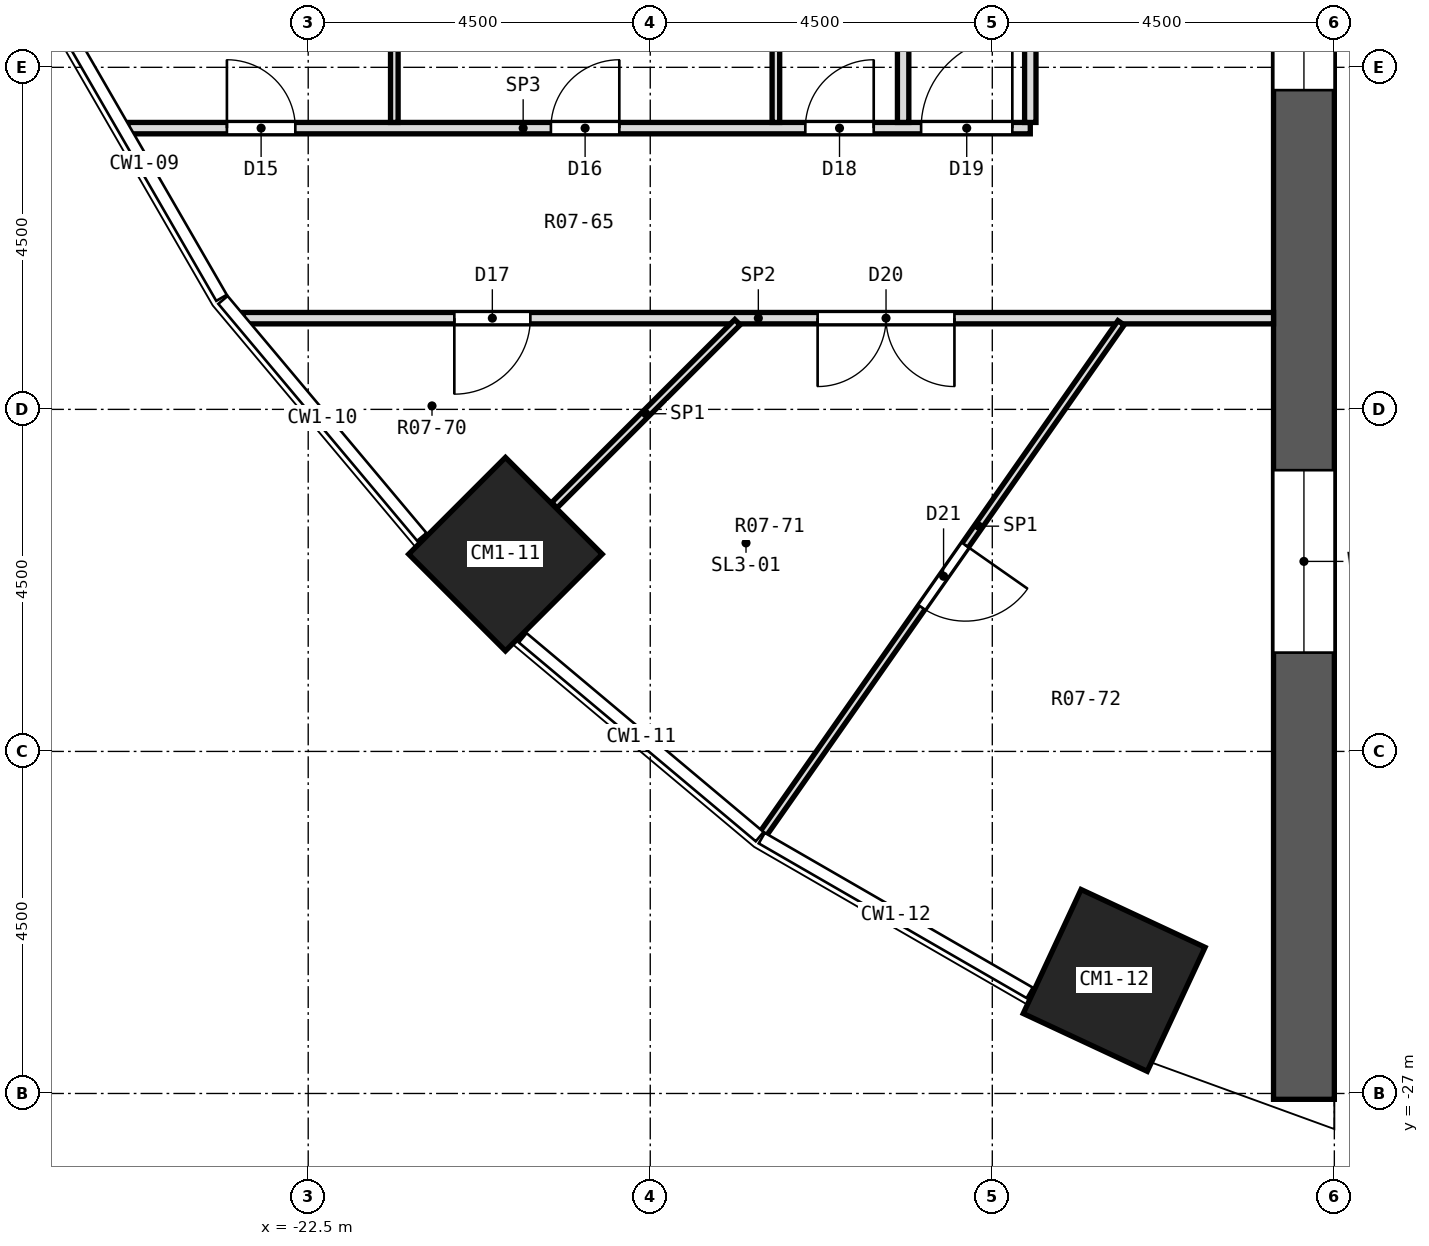
"""IFC4 building model, lengths in metres.
Left out: names, types, materials, properties, quantities, classifications, styles, units other than length and angle.
Written with IfcOpenShell. Run it as: python <this file> out.ifc"""

import sys

from ifc_helpers import new_model, si_unit, direction, frame, frame_2d, origin, origin_2d, place, context, subcontext, project, spatial, polyline, rectangle, outline, extrude, element, fill, save


model = new_model("IFC4")
c1 = context("Model", 3, precision=1e-05, world=origin(), true_north=direction((0.0, 1.0)))
c2 = subcontext(c1, "Body", "Model", "MODEL_VIEW")
j1 = project(units=[si_unit("LENGTHUNIT", "METRE"), si_unit("PLANEANGLEUNIT", "RADIAN")], contexts=[c1])
p1 = place(None, origin())
s1 = spatial("IfcSite", under=j1, at=p1, CompositionType="ELEMENT")
p2 = place(p1, origin())
s2 = spatial("IfcBuilding", under=s1, at=p2, CompositionType="ELEMENT")
p3 = place(p2, frame((0.0, 0.0, 17.6)))
s3 = spatial("IfcBuildingStorey", under=s2, at=p3, CompositionType="ELEMENT", Elevation=17.6)
for number, where, z_axis, x_axis in (
    (1, (-19.905, -19.905, 0.0), (0.0, 0.0, 1.0), (-0.707, -0.707, 0.0)),
    (2, (-11.897, -25.512, 0.0), (0.0, 0.0, 1.0), (-0.423, -0.906, 0.0)),
):
    element("IfcColumn", number, at=place(p3, frame(where, z_axis=z_axis, x_axis=x_axis)), inside=s3, PredefinedType="COLUMN", context=c2, shape_type="SweptSolid", body=[
        extrude(rectangle(XDim=1.8, YDim=1.8, at=origin_2d()), origin(), (0.0, 0.0, 1.0), 4.2),
    ])
p4 = place(p3, frame((-9.4, -27.077, 0.0), z_axis=(0.0, 0.0, 1.0), x_axis=(0.0, 1.0, 0.0)))
e3 = element("IfcWall", 3, at=p4, inside=s3, PredefinedType="SHEAR", context=c2, shape_type="SweptSolid", body=[
    extrude(rectangle(XDim=54.154, YDim=0.8, at=frame_2d((27.077, 0.0))), origin(), (0.0, 0.0, 1.0), 4.2),
])
p5 = place(p4, frame((13.277, 0.0, 0.9)))
e4 = element("IfcOpeningElement", 4, at=p5, cuts=e3, PredefinedType="OPENING", context=c2, shape_type="SweptSolid", body=[
    extrude(rectangle(XDim=2.4, YDim=2.1, at=frame_2d((1.2, 1.05))), frame((0.0, 0.412, 0.0), z_axis=(0.0, -1.0, 0.0), x_axis=(1.0, 0.0, 0.0)), (0.0, 0.0, 1.0), 0.824),
])
p6 = place(p4, frame((17.877, 0.0, 0.9)))
e5 = element("IfcOpeningElement", 5, at=p6, cuts=e3, PredefinedType="OPENING", context=c2, shape_type="SweptSolid", body=[
    extrude(rectangle(XDim=2.4, YDim=2.1, at=frame_2d((1.2, 1.05))), frame((0.0, 0.412, 0.0), z_axis=(0.0, -1.0, 0.0), x_axis=(1.0, 0.0, 0.0)), (0.0, 0.0, 1.0), 0.824),
])
p7 = place(p4, frame((22.477, 0.0, 0.9)))
e6 = element("IfcOpeningElement", 6, at=p7, cuts=e3, PredefinedType="OPENING", context=c2, shape_type="SweptSolid", body=[
    extrude(rectangle(XDim=2.4, YDim=2.1, at=frame_2d((1.2, 1.05))), frame((0.0, 0.412, 0.0), z_axis=(0.0, -1.0, 0.0), x_axis=(1.0, 0.0, 0.0)), (0.0, 0.0, 1.0), 0.824),
])
p8 = place(p4, frame((29.277, 0.0, 0.9)))
e7 = element("IfcOpeningElement", 7, at=p8, cuts=e3, PredefinedType="OPENING", context=c2, shape_type="SweptSolid", body=[
    extrude(rectangle(XDim=2.4, YDim=2.1, at=frame_2d((1.2, 1.05))), frame((0.0, 0.412, 0.0), z_axis=(0.0, -1.0, 0.0), x_axis=(1.0, 0.0, 0.0)), (0.0, 0.0, 1.0), 0.824),
])
p9 = place(p4, frame((33.877, 0.0, 0.9)))
e8 = element("IfcOpeningElement", 8, at=p9, cuts=e3, PredefinedType="OPENING", context=c2, shape_type="SweptSolid", body=[
    extrude(rectangle(XDim=2.4, YDim=2.1, at=frame_2d((1.2, 1.05))), frame((0.0, 0.412, 0.0), z_axis=(0.0, -1.0, 0.0), x_axis=(1.0, 0.0, 0.0)), (0.0, 0.0, 1.0), 0.824),
])
p10 = place(p4, frame((38.477, 0.0, 0.9)))
e9 = element("IfcOpeningElement", 9, at=p10, cuts=e3, PredefinedType="OPENING", context=c2, shape_type="SweptSolid", body=[
    extrude(rectangle(XDim=2.4, YDim=2.1, at=frame_2d((1.2, 1.05))), frame((0.0, 0.412, 0.0), z_axis=(0.0, -1.0, 0.0), x_axis=(1.0, 0.0, 0.0)), (0.0, 0.0, 1.0), 0.824),
])
p11 = place(p4, frame((5.877, 0.0, 0.9)))
e10 = element("IfcOpeningElement", 10, at=p11, cuts=e3, PredefinedType="OPENING", context=c2, shape_type="SweptSolid", body=[
    extrude(rectangle(XDim=2.4, YDim=2.1, at=frame_2d((1.2, 1.05))), frame((0.0, 0.412, 0.0), z_axis=(0.0, -1.0, 0.0), x_axis=(1.0, 0.0, 0.0)), (0.0, 0.0, 1.0), 0.824),
])
p12 = place(p4, frame((45.877, 0.0, 0.9)))
e11 = element("IfcOpeningElement", 11, at=p12, cuts=e3, PredefinedType="OPENING", context=c2, shape_type="SweptSolid", body=[
    extrude(rectangle(XDim=2.4, YDim=2.1, at=frame_2d((1.2, 1.05))), frame((0.0, 0.412, 0.0), z_axis=(0.0, -1.0, 0.0), x_axis=(1.0, 0.0, 0.0)), (0.0, 0.0, 1.0), 0.824),
])
p13 = place(p3, frame((-11.629, -26.474, 0.0), z_axis=(-0.342019741746, -0.939690603584, 0.002016380761), x_axis=(0.00067819462, 0.001898944936, 0.999997967028)))
e12 = element("IfcWall", 12, at=p13, inside=s3, PredefinedType="SOLIDWALL", context=c2, shape_type="SweptSolid", body=[
    extrude(outline(polyline([(0.0, 0.0), (3.6, -1.423e-19), (3.6, -3.745), (-4.563e-05, -3.745), (0.0, 0.0)])), origin(), (0.0, 0.0, -1.0), 0.38),
])
p14 = place(p3, frame((-23.355, -16.8, 0.0), z_axis=(0.0, 0.0, 1.0), x_axis=(1.0, 0.0, 0.0)))
e13 = element("IfcWall", 13, at=p14, inside=s3, PredefinedType="PARTITIONING", context=c2, shape_type="SweptSolid", body=[
    extrude(rectangle(XDim=13.555, YDim=0.15, at=frame_2d((6.777, 0.0))), origin(), (0.0, 0.0, 1.0), 3.6),
])
p15 = place(p14, frame((2.778, 0.0, 0.0)))
e14 = element("IfcOpeningElement", 14, at=p15, cuts=e13, PredefinedType="OPENING", context=c2, shape_type="SweptSolid", body=[
    extrude(rectangle(XDim=1.0, YDim=2.1, at=frame_2d((0.5, 1.05))), frame((0.0, 0.087, 0.0), z_axis=(0.0, -1.0, 0.0), x_axis=(1.0, 0.0, 0.0)), (0.0, 0.0, 1.0), 0.174),
])
p16 = place(p14, frame((7.557, 0.0, 0.0)))
e15 = element("IfcOpeningElement", 15, at=p16, cuts=e13, PredefinedType="OPENING", context=c2, shape_type="SweptSolid", body=[
    extrude(rectangle(XDim=1.8, YDim=2.1, at=frame_2d((0.9, 1.05))), frame((0.0, 0.087, 0.0), z_axis=(0.0, -1.0, 0.0), x_axis=(1.0, 0.0, 0.0)), (0.0, 0.0, 1.0), 0.174),
])
p17 = place(p3, frame((-24.872, -14.3, 0.0), z_axis=(0.0, 0.0, 1.0), x_axis=(1.0, 0.0, 0.0)))
e16 = element("IfcWall", 16, at=p17, inside=s3, PredefinedType="PARTITIONING", context=c2, shape_type="SweptSolid", body=[
    extrude(rectangle(XDim=11.872, YDim=0.15, at=frame_2d((5.936, 0.0))), origin(), (0.0, 0.0, 1.0), 3.6),
])
p18 = place(p17, frame((1.302, 0.0, 0.0)))
e17 = element("IfcOpeningElement", 17, at=p18, cuts=e16, PredefinedType="OPENING", context=c2, shape_type="SweptSolid", body=[
    extrude(rectangle(XDim=0.9, YDim=2.1, at=frame_2d((0.45, 1.05))), frame((0.0, 0.087, 0.0), z_axis=(0.0, -1.0, 0.0), x_axis=(1.0, 0.0, 0.0)), (0.0, 0.0, 1.0), 0.174),
])
p19 = place(p17, frame((5.565, 0.0, 0.0)))
e18 = element("IfcOpeningElement", 18, at=p19, cuts=e16, PredefinedType="OPENING", context=c2, shape_type="SweptSolid", body=[
    extrude(rectangle(XDim=0.9, YDim=2.1, at=frame_2d((0.45, 1.05))), frame((0.0, 0.087, 0.0), z_axis=(0.0, -1.0, 0.0), x_axis=(1.0, 0.0, 0.0)), (0.0, 0.0, 1.0), 0.174),
])
p20 = place(p17, frame((8.912, 0.0, 0.0)))
e19 = element("IfcOpeningElement", 19, at=p20, cuts=e16, PredefinedType="OPENING", context=c2, shape_type="SweptSolid", body=[
    extrude(rectangle(XDim=0.9, YDim=2.1, at=frame_2d((0.45, 1.05))), frame((0.0, 0.087, 0.0), z_axis=(0.0, -1.0, 0.0), x_axis=(1.0, 0.0, 0.0)), (0.0, 0.0, 1.0), 0.174),
])
p21 = place(p17, frame((10.436, 0.0, 0.0)))
e20 = element("IfcOpeningElement", 20, at=p21, cuts=e16, PredefinedType="OPENING", context=c2, shape_type="SweptSolid", body=[
    extrude(rectangle(XDim=1.2, YDim=2.1, at=frame_2d((0.6, 1.05))), frame((0.0, 0.087, 0.0), z_axis=(0.0, -1.0, 0.0), x_axis=(1.0, 0.0, 0.0)), (0.0, 0.0, 1.0), 0.174),
])
p22 = place(p3, frame((-19.262, -19.262, 0.0), z_axis=(0.0, 0.0, 1.0), x_axis=(0.707106781187, 0.707106781187, 0.0)))
e21 = element("IfcWall", 21, at=p22, inside=s3, PredefinedType="PARTITIONING", context=c2, shape_type="SweptSolid", body=[
    extrude(rectangle(XDim=3.406, YDim=0.1, at=frame_2d((1.703, 0.0))), origin(), (0.0, 0.0, 1.0), 3.6),
])
p23 = place(p3, frame((-16.519, -23.591, 0.0), z_axis=(0.0, 0.0, 1.0), x_axis=(0.573651788308, 0.819099277115, 0.0)))
e22 = element("IfcWall", 22, at=p23, inside=s3, PredefinedType="PARTITIONING", context=c2, shape_type="SweptSolid", body=[
    extrude(rectangle(XDim=8.216, YDim=0.1, at=frame_2d((4.108, 0.0))), origin(), (0.0, 0.0, 1.0), 3.6),
])
p24 = place(p23, frame((3.646, 0.0, 0.0)))
e23 = element("IfcOpeningElement", 23, at=p24, cuts=e22, PredefinedType="OPENING", context=c2, shape_type="SweptSolid", body=[
    extrude(rectangle(XDim=1.0, YDim=2.1, at=frame_2d((0.5, 1.05))), frame((0.0, 0.062, 0.0), z_axis=(0.0, -1.0, 0.0), x_axis=(1.0, 0.0, 0.0)), (0.0, 0.0, 1.0), 0.124),
])
for number, where, z_axis, x_axis in (
    (24, (-13.0, -14.225, 0.0), (0.0, 0.0, 1.0), (0.0, 1.0, 0.0)),
    (25, (-14.673, -14.225, 0.0), (0.0, 0.0, 1.0), (0.0, 1.0, 0.0)),
):
    element("IfcWall", number, at=place(p3, frame(where, z_axis=z_axis, x_axis=x_axis)), inside=s3, PredefinedType="PARTITIONING", context=c2, shape_type="SweptSolid", body=[
        extrude(rectangle(XDim=4.725, YDim=0.15, at=frame_2d((2.363, 0.0))), origin(), (0.0, 0.0, 1.0), 3.6),
    ])
for number, where, z_axis, x_axis in (
    (26, (-16.347, -14.225, 0.0), (0.0, 0.0, 1.0), (0.0, 1.0, 0.0)),
    (27, (-21.367, -14.225, 0.0), (0.0, 0.0, 1.0), (0.0, 1.0, 0.0)),
):
    element("IfcWall", number, at=place(p3, frame(where, z_axis=z_axis, x_axis=x_axis)), inside=s3, PredefinedType="PARTITIONING", context=c2, shape_type="SweptSolid", body=[
        extrude(rectangle(XDim=4.725, YDim=0.1, at=frame_2d((2.363, 0.0))), origin(), (0.0, 0.0, 1.0), 3.6),
    ])
p25 = place(p18, origin())
e28 = element("IfcDoor", 28, at=p25, inside=s3, OperationType="SINGLE_SWING_LEFT", PredefinedType="DOOR", context=c2, shape_type="SweptSolid", body=[
    extrude(rectangle(XDim=0.9, YDim=2.1, at=frame_2d((0.45, 1.05))), frame((0.0, 0.025, 0.0), z_axis=(0.0, -1.0, 0.0), x_axis=(1.0, 0.0, 0.0)), (0.0, 0.0, 1.0), 0.05),
])
fill(e17, e28)
p26 = place(p19, origin())
e29 = element("IfcDoor", 29, at=p26, inside=s3, OperationType="SINGLE_SWING_RIGHT", PredefinedType="DOOR", context=c2, shape_type="SweptSolid", body=[
    extrude(rectangle(XDim=0.9, YDim=2.1, at=frame_2d((0.45, 1.05))), frame((0.0, 0.025, 0.0), z_axis=(0.0, -1.0, 0.0), x_axis=(1.0, 0.0, 0.0)), (0.0, 0.0, 1.0), 0.05),
])
fill(e18, e29)
p27 = place(p15, frame((1.0, 0.0, 0.0), z_axis=(0.0, 0.0, 1.0), x_axis=(-1.0, 0.0, 0.0)))
e30 = element("IfcDoor", 30, at=p27, inside=s3, OperationType="SINGLE_SWING_RIGHT", PredefinedType="DOOR", context=c2, shape_type="SweptSolid", body=[
    extrude(rectangle(XDim=1.0, YDim=2.1, at=frame_2d((0.5, 1.05))), frame((0.0, 0.025, 0.0), z_axis=(0.0, -1.0, 0.0), x_axis=(1.0, 0.0, 0.0)), (0.0, 0.0, 1.0), 0.05),
])
fill(e14, e30)
p28 = place(p20, origin())
e31 = element("IfcDoor", 31, at=p28, inside=s3, OperationType="SINGLE_SWING_RIGHT", PredefinedType="DOOR", context=c2, shape_type="SweptSolid", body=[
    extrude(rectangle(XDim=0.9, YDim=2.1, at=frame_2d((0.45, 1.05))), frame((0.0, 0.025, 0.0), z_axis=(0.0, -1.0, 0.0), x_axis=(1.0, 0.0, 0.0)), (0.0, 0.0, 1.0), 0.05),
])
fill(e19, e31)
p29 = place(p21, origin())
e32 = element("IfcDoor", 32, at=p29, inside=s3, OperationType="SINGLE_SWING_RIGHT", PredefinedType="DOOR", context=c2, shape_type="SweptSolid", body=[
    extrude(rectangle(XDim=1.2, YDim=2.1, at=frame_2d((0.6, 1.05))), frame((0.0, 0.025, 0.0), z_axis=(0.0, -1.0, 0.0), x_axis=(1.0, 0.0, 0.0)), (0.0, 0.0, 1.0), 0.05),
])
fill(e20, e32)
p30 = place(p16, frame((1.8, 0.0, 0.0), z_axis=(0.0, 0.0, 1.0), x_axis=(-1.0, 0.0, 0.0)))
e33 = element("IfcDoor", 33, at=p30, inside=s3, OperationType="DOUBLE_DOOR_SINGLE_SWING", PredefinedType="DOOR", context=c2, shape_type="SweptSolid", body=[
    extrude(rectangle(XDim=1.8, YDim=2.1, at=frame_2d((0.9, 1.05))), frame((0.0, 0.025, 0.0), z_axis=(0.0, -1.0, 0.0), x_axis=(1.0, 0.0, 0.0)), (0.0, 0.0, 1.0), 0.05),
])
fill(e15, e33)
p31 = place(p24, frame((1.0, 0.0, 0.0), z_axis=(0.0, 0.0, 1.0), x_axis=(-1.0, 0.0, 0.0)))
e34 = element("IfcDoor", 34, at=p31, inside=s3, OperationType="SINGLE_SWING_LEFT", PredefinedType="DOOR", context=c2, shape_type="SweptSolid", body=[
    extrude(rectangle(XDim=1.0, YDim=2.1, at=frame_2d((0.5, 1.05))), frame((0.0, 0.025, 0.0), z_axis=(0.0, -1.0, 0.0), x_axis=(1.0, 0.0, 0.0)), (0.0, 0.0, 1.0), 0.05),
])
fill(e23, e34)
p32 = place(p5, origin())
e35 = element("IfcWindow", 35, at=p32, inside=s3, PartitioningType="SINGLE_PANEL", PredefinedType="WINDOW", context=c2, shape_type="SweptSolid", body=[
    extrude(rectangle(XDim=2.4, YDim=2.1, at=frame_2d((1.2, 1.05))), frame((0.0, 0.03, 0.0), z_axis=(0.0, -1.0, 0.0), x_axis=(1.0, 0.0, 0.0)), (0.0, 0.0, 1.0), 0.06),
])
fill(e4, e35)
p33 = place(p11, origin())
e36 = element("IfcWindow", 36, at=p33, inside=s3, PartitioningType="SINGLE_PANEL", PredefinedType="WINDOW", context=c2, shape_type="SweptSolid", body=[
    extrude(rectangle(XDim=2.4, YDim=2.1, at=frame_2d((1.2, 1.05))), frame((0.0, 0.03, 0.0), z_axis=(0.0, -1.0, 0.0), x_axis=(1.0, 0.0, 0.0)), (0.0, 0.0, 1.0), 0.06),
])
fill(e10, e36)
save(model, sys.argv[1])
